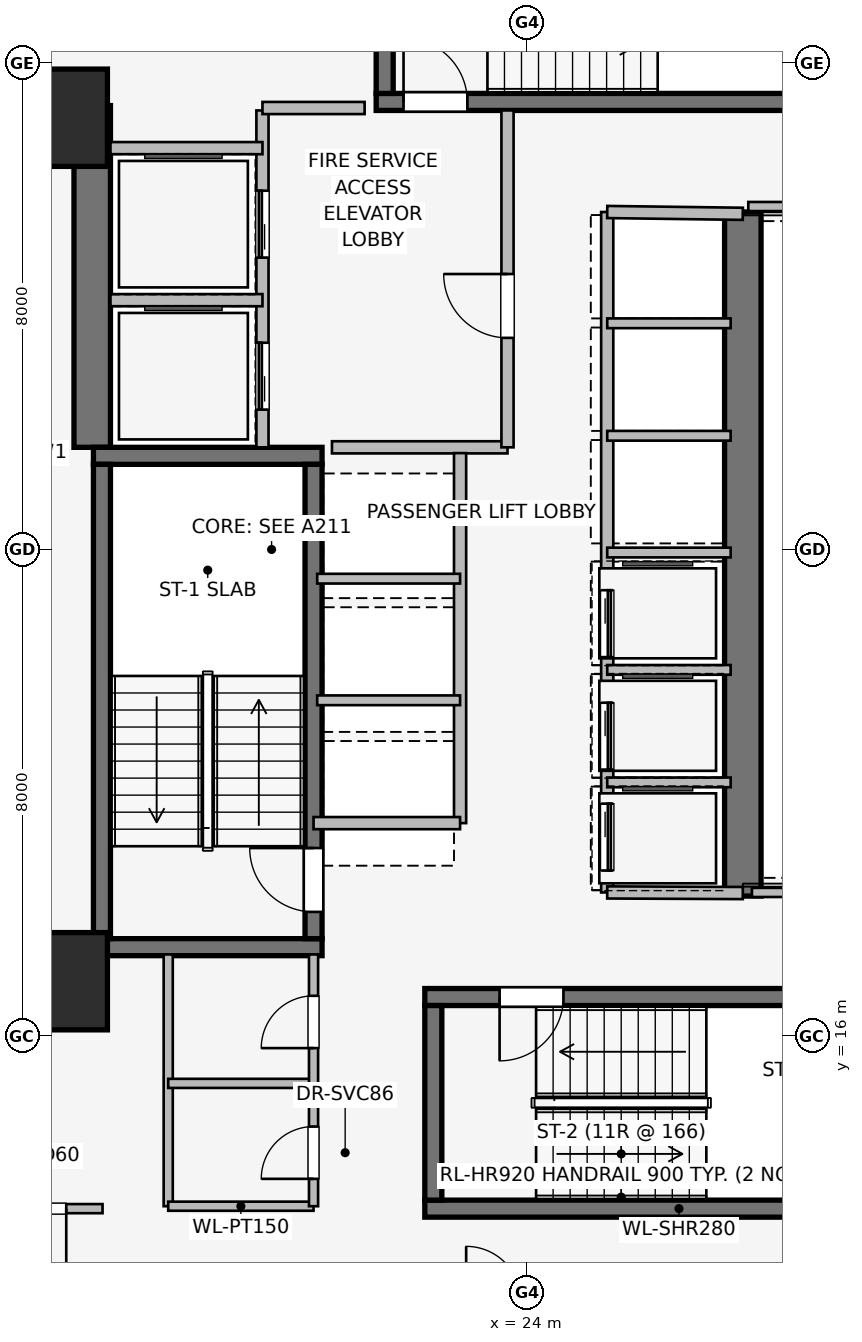
"""IFC4 building model, lengths in metres.
Left out: names, types, materials, properties, quantities, classifications, styles, units other than length and angle.
Written with IfcOpenShell. Run it as: python <this file> out.ifc"""

import sys

from ifc_helpers import new_model, si_unit, direction, frame, frame_2d, origin, origin_2d, place, context, subcontext, project, spatial, rectangle, extrude, element, fill, save


model = new_model("IFC4")
c1 = context("Model", 3, precision=1e-05, world=origin(), true_north=direction((0.0, 1.0)))
c2 = subcontext(c1, "Body", "Model", "MODEL_VIEW")
j1 = project(units=[si_unit("LENGTHUNIT", "METRE"), si_unit("PLANEANGLEUNIT", "RADIAN")], contexts=[c1])
p1 = place(None, origin())
s1 = spatial("IfcSite", under=j1, at=p1, CompositionType="ELEMENT")
p2 = place(p1, origin())
s2 = spatial("IfcBuilding", under=s1, at=p2, CompositionType="ELEMENT")
p3 = place(p2, frame((0.0, 0.0, 37.95)))
s3 = spatial("IfcBuildingStorey", under=s2, at=p3, CompositionType="ELEMENT", Elevation=37.95)
p4 = place(p3, frame((16.85, 25.68, 0.0), z_axis=(0.0, 0.0, 1.0), x_axis=(0.0, 1.0, 0.0)))
e1 = element("IfcWall", 1, at=p4, inside=s3, PredefinedType="SHEAR", context=c2, shape_type="SweptSolid", body=[
    extrude(rectangle(XDim=5.62, YDim=0.6, at=frame_2d((2.81, 0.0))), origin(), (0.0, 0.0, 1.0), 3.65),
])
p5 = place(p3, frame((27.55, 29.55, 0.0), z_axis=(0.0, 0.0, 1.0), x_axis=(0.0, -1.0, 0.0)))
e2 = element("IfcWall", 2, at=p5, inside=s3, PredefinedType="SHEAR", context=c2, shape_type="SweptSolid", body=[
    extrude(rectangle(XDim=11.25, YDim=0.6, at=frame_2d((5.625, 0.0))), origin(), (0.0, 0.0, 1.0), 3.65),
])
for number, where, z_axis, x_axis in (
    (3, (16.87, 17.46, 0.0), (0.0, 0.0, 1.0), (1.0, 0.0, 0.0)),
    (4, (20.63, 25.54, 0.0), (0.0, 0.0, 1.0), (-1.0, 0.0, 0.0)),
):
    element("IfcWall", number, at=place(p3, frame(where, z_axis=z_axis, x_axis=x_axis)), inside=s3, PredefinedType="SHEAR", context=c2, shape_type="SweptSolid", body=[
        extrude(rectangle(XDim=3.76, YDim=0.28, at=frame_2d((1.88, 0.0))), origin(), (0.0, 0.0, 1.0), 3.65),
    ])
p6 = place(p3, frame((17.01, 25.4, 0.0), z_axis=(0.0, 0.0, 1.0), x_axis=(0.0, -1.0, 0.0)))
e5 = element("IfcWall", 5, at=p6, inside=s3, PredefinedType="SHEAR", context=c2, shape_type="SweptSolid", body=[
    extrude(rectangle(XDim=7.8, YDim=0.28, at=frame_2d((3.9, 0.0))), origin(), (0.0, 0.0, 1.0), 3.65),
])
p7 = place(p3, frame((20.49, 17.6, 0.0), z_axis=(0.0, 0.0, 1.0), x_axis=(0.0, 1.0, 0.0)))
e6 = element("IfcWall", 6, at=p7, inside=s3, PredefinedType="SHEAR", context=c2, shape_type="SweptSolid", body=[
    extrude(rectangle(XDim=7.8, YDim=0.28, at=frame_2d((3.9, 0.0))), origin(), (0.0, 0.0, 1.0), 3.65),
])
p8 = place(p7, frame((0.44, 0.0, 0.0)))
e7 = element("IfcOpeningElement", 7, at=p8, cuts=e6, PredefinedType="OPENING", context=c2, shape_type="SweptSolid", body=[
    extrude(rectangle(XDim=1.05, YDim=2.0, at=frame_2d((0.525, 1.0))), frame((0.0, 0.15, 0.0), z_axis=(0.0, -1.0, 0.0), x_axis=(1.0, 0.0, 0.0)), (0.0, 0.0, 1.0), 0.3),
])
p9 = place(p3, frame((22.32, 13.16, 0.0), z_axis=(0.0, 0.0, 1.0), x_axis=(1.0, 0.0, 0.0)))
e8 = element("IfcWall", 8, at=p9, inside=s3, PredefinedType="SHEAR", context=c2, shape_type="SweptSolid", body=[
    extrude(rectangle(XDim=8.36, YDim=0.28, at=frame_2d((4.18, 0.0))), origin(), (0.0, 0.0, 1.0), 3.65),
])
p10 = place(p3, frame((30.68, 16.64, 0.0), z_axis=(0.0, 0.0, 1.0), x_axis=(-1.0, 0.0, 0.0)))
e9 = element("IfcWall", 9, at=p10, inside=s3, PredefinedType="SHEAR", context=c2, shape_type="SweptSolid", body=[
    extrude(rectangle(XDim=8.36, YDim=0.28, at=frame_2d((4.18, 0.0))), origin(), (0.0, 0.0, 1.0), 3.65),
])
p11 = place(p10, frame((6.08, 0.0, 0.0)))
e10 = element("IfcOpeningElement", 10, at=p11, cuts=e9, PredefinedType="OPENING", context=c2, shape_type="SweptSolid", body=[
    extrude(rectangle(XDim=1.05, YDim=2.0, at=frame_2d((0.525, 1.0))), frame((0.0, 0.15, 0.0), z_axis=(0.0, -1.0, 0.0), x_axis=(1.0, 0.0, 0.0)), (0.0, 0.0, 1.0), 0.3),
])
p12 = place(p3, frame((22.46, 16.5, 0.0), z_axis=(0.0, 0.0, 1.0), x_axis=(0.0, -1.0, 0.0)))
e11 = element("IfcWall", 11, at=p12, inside=s3, PredefinedType="SHEAR", context=c2, shape_type="SweptSolid", body=[
    extrude(rectangle(XDim=3.2, YDim=0.28, at=frame_2d((1.6, 0.0))), origin(), (0.0, 0.0, 1.0), 3.65),
])
p13 = place(p3, frame((21.52, 31.36, 0.0), z_axis=(0.0, 0.0, 1.0), x_axis=(1.0, 0.0, 0.0)))
e12 = element("IfcWall", 12, at=p13, inside=s3, PredefinedType="SHEAR", context=c2, shape_type="SweptSolid", body=[
    extrude(rectangle(XDim=8.36, YDim=0.28, at=frame_2d((4.18, 0.0))), origin(), (0.0, 0.0, 1.0), 3.65),
])
p14 = place(p13, frame((0.45, 0.0, 0.0)))
e13 = element("IfcOpeningElement", 13, at=p14, cuts=e12, PredefinedType="OPENING", context=c2, shape_type="SweptSolid", body=[
    extrude(rectangle(XDim=1.05, YDim=2.0, at=frame_2d((0.525, 1.0))), frame((0.0, 0.15, 0.0), z_axis=(0.0, -1.0, 0.0), x_axis=(1.0, 0.0, 0.0)), (0.0, 0.0, 1.0), 0.3),
])
p15 = place(p3, frame((21.66, 34.7, 0.0), z_axis=(0.0, 0.0, 1.0), x_axis=(0.0, -1.0, 0.0)))
e14 = element("IfcWall", 14, at=p15, inside=s3, PredefinedType="SHEAR", context=c2, shape_type="SweptSolid", body=[
    extrude(rectangle(XDim=3.2, YDim=0.28, at=frame_2d((1.6, 0.0))), origin(), (0.0, 0.0, 1.0), 3.65),
])
for number, where, z_axis, x_axis in (
    (15, (16.3, 16.9, 0.0), (0.0, 0.0, 1.0), (1.0, 0.0, 0.0)),
    (16, (16.3, 31.1, 0.0), (0.0, 0.0, 1.0), (1.0, 0.0, 0.0)),
):
    element("IfcColumn", number, at=place(p3, frame(where, z_axis=z_axis, x_axis=x_axis)), inside=s3, PredefinedType="COLUMN", context=c2, shape_type="SweptSolid", body=[
        extrude(rectangle(XDim=1.6, YDim=1.6, at=origin_2d()), origin(), (0.0, 0.0, 1.0), 3.65),
    ])
p16 = place(p3, frame((19.65, 25.68, 0.0), z_axis=(0.0, 0.0, 1.0), x_axis=(0.0, 1.0, 0.0)))
e17 = element("IfcWall", 17, at=p16, inside=s3, PredefinedType="PARTITIONING", context=c2, shape_type="SweptSolid", body=[
    extrude(rectangle(XDim=5.54, YDim=0.2, at=frame_2d((2.77, 0.0))), origin(), (0.0, 0.0, 1.0), 3.39),
])
p17 = place(p16, frame((0.62, 0.0, 0.0)))
e18 = element("IfcOpeningElement", 18, at=p17, cuts=e17, PredefinedType="OPENING", context=c2, shape_type="SweptSolid", body=[
    extrude(rectangle(XDim=1.1, YDim=2.2, at=frame_2d((0.55, 1.1))), frame((0.0, 0.11, 0.0), z_axis=(0.0, -1.0, 0.0), x_axis=(1.0, 0.0, 0.0)), (0.0, 0.0, 1.0), 0.22),
])
p18 = place(p16, frame((3.12, 0.0, 0.0)))
e19 = element("IfcOpeningElement", 19, at=p18, cuts=e17, PredefinedType="OPENING", context=c2, shape_type="SweptSolid", body=[
    extrude(rectangle(XDim=1.1, YDim=2.2, at=frame_2d((0.55, 1.1))), frame((0.0, 0.11, 0.0), z_axis=(0.0, -1.0, 0.0), x_axis=(1.0, 0.0, 0.0)), (0.0, 0.0, 1.0), 0.22),
])
p19 = place(p3, frame((20.793, 25.68, 0.0), z_axis=(0.0, 0.0, 1.0), x_axis=(1.0, 0.0, 0.0)))
e20 = element("IfcWall", 20, at=p19, inside=s3, PredefinedType="PARTITIONING", context=c2, shape_type="SweptSolid", body=[
    extrude(rectangle(XDim=2.887, YDim=0.2, at=frame_2d((1.443, 0.0))), origin(), (0.0, 0.0, 1.0), 3.39),
])
p20 = place(p3, frame((23.68, 25.68, 0.0), z_axis=(0.0, 0.0, 1.0), x_axis=(0.0, 1.0, 0.0)))
e21 = element("IfcWall", 21, at=p20, inside=s3, PredefinedType="PARTITIONING", context=c2, shape_type="SweptSolid", body=[
    extrude(rectangle(XDim=5.54, YDim=0.2, at=frame_2d((2.77, 0.0))), origin(), (0.0, 0.0, 1.0), 3.39),
])
p21 = place(p20, frame((1.8, 0.0, 0.0)))
e22 = element("IfcOpeningElement", 22, at=p21, cuts=e21, PredefinedType="OPENING", context=c2, shape_type="SweptSolid", body=[
    extrude(rectangle(XDim=1.05, YDim=2.0, at=frame_2d((0.525, 1.0))), frame((0.0, 0.11, 0.0), z_axis=(0.0, -1.0, 0.0), x_axis=(1.0, 0.0, 0.0)), (0.0, 0.0, 1.0), 0.22),
])
p22 = place(p3, frame((21.33, 31.26, 0.0), z_axis=(0.0, 0.0, 1.0), x_axis=(-1.0, 0.0, 0.0)))
e23 = element("IfcWall", 23, at=p22, inside=s3, PredefinedType="PARTITIONING", context=c2, shape_type="SweptSolid", body=[
    extrude(rectangle(XDim=1.68, YDim=0.2, at=frame_2d((0.84, 0.0))), origin(), (0.0, 0.0, 1.0), 3.39),
])
p23 = place(p3, frame((17.15, 28.1, 0.0), z_axis=(0.0, 0.0, 1.0), x_axis=(1.0, 0.0, 0.0)))
e24 = element("IfcWall", 24, at=p23, inside=s3, PredefinedType="PARTITIONING", context=c2, shape_type="SweptSolid", body=[
    extrude(rectangle(XDim=2.5, YDim=0.2, at=frame_2d((1.25, 0.0))), origin(), (0.0, 0.0, 1.0), 3.39),
])
p24 = place(p3, frame((19.65, 30.6, 0.0), z_axis=(0.0, 0.0, 1.0), x_axis=(-1.0, 0.0, 0.0)))
e25 = element("IfcWall", 25, at=p24, inside=s3, PredefinedType="PARTITIONING", context=c2, shape_type="SweptSolid", body=[
    extrude(rectangle(XDim=2.5, YDim=0.2, at=frame_2d((1.25, 0.0))), origin(), (0.0, 0.0, 1.0), 2.29),
])
p25 = place(p3, frame((22.9, 19.5, 0.0), z_axis=(0.0, 0.0, 1.0), x_axis=(0.0, 1.0, 0.0)))
e26 = element("IfcWall", 26, at=p25, inside=s3, PredefinedType="PARTITIONING", context=c2, shape_type="SweptSolid", body=[
    extrude(rectangle(XDim=6.085, YDim=0.2, at=frame_2d((3.042, 0.0))), origin(), (0.0, 0.0, 1.0), 3.39),
])
p26 = place(p3, frame((20.49, 19.5, 0.0), z_axis=(0.0, 0.0, 1.0), x_axis=(1.0, 0.0, 0.0)))
e27 = element("IfcWall", 27, at=p26, inside=s3, PredefinedType="PARTITIONING", context=c2, shape_type="SweptSolid", body=[
    extrude(rectangle(XDim=2.41, YDim=0.2, at=frame_2d((1.205, 0.0))), origin(), (0.0, 0.0, 1.0), 2.29),
])
for number, where, z_axis, x_axis in (
    (28, (20.55, 21.52, 0.0), (0.0, 0.0, 1.0), (1.0, 0.0, 0.0)),
    (29, (20.55, 23.52, 0.0), (0.0, 0.0, 1.0), (1.0, 0.0, 0.0)),
):
    element("IfcWall", number, at=place(p3, frame(where, z_axis=z_axis, x_axis=x_axis)), inside=s3, PredefinedType="PARTITIONING", context=c2, shape_type="SweptSolid", body=[
        extrude(rectangle(XDim=2.35, YDim=0.16, at=frame_2d((1.175, 0.0))), origin(), (0.0, 0.0, 1.0), 3.39),
    ])
p27 = place(p3, frame((25.32, 29.55, 0.0), z_axis=(0.0, 0.0, 1.0), x_axis=(0.0, -1.0, 0.0)))
e30 = element("IfcWall", 30, at=p27, inside=s3, PredefinedType="PARTITIONING", context=c2, shape_type="SweptSolid", body=[
    extrude(rectangle(XDim=11.19, YDim=0.2, at=frame_2d((5.595, 0.0))), origin(), (0.0, 0.0, 1.0), 3.39),
])
p28 = place(p27, frame((6.22, 0.0, 0.0)))
e31 = element("IfcOpeningElement", 31, at=p28, cuts=e30, PredefinedType="OPENING", context=c2, shape_type="SweptSolid", body=[
    extrude(rectangle(XDim=1.1, YDim=2.2, at=frame_2d((0.55, 1.1))), frame((0.0, 0.11, 0.0), z_axis=(0.0, -1.0, 0.0), x_axis=(1.0, 0.0, 0.0)), (0.0, 0.0, 1.0), 0.22),
])
p29 = place(p27, frame((8.07, 0.0, 0.0)))
e32 = element("IfcOpeningElement", 32, at=p29, cuts=e30, PredefinedType="OPENING", context=c2, shape_type="SweptSolid", body=[
    extrude(rectangle(XDim=1.1, YDim=2.2, at=frame_2d((0.55, 1.1))), frame((0.0, 0.11, 0.0), z_axis=(0.0, -1.0, 0.0), x_axis=(1.0, 0.0, 0.0)), (0.0, 0.0, 1.0), 0.22),
])
p30 = place(p27, frame((9.73, 0.0, 0.0)))
e33 = element("IfcOpeningElement", 33, at=p30, cuts=e30, PredefinedType="OPENING", context=c2, shape_type="SweptSolid", body=[
    extrude(rectangle(XDim=1.1, YDim=2.2, at=frame_2d((0.55, 1.1))), frame((0.0, 0.11, 0.0), z_axis=(0.0, -1.0, 0.0), x_axis=(1.0, 0.0, 0.0)), (0.0, 0.0, 1.0), 0.22),
])
p31 = place(p3, frame((25.32, 18.36, 0.0), z_axis=(0.0, 0.0, 1.0), x_axis=(0.999989925833, -0.004488678231, 0.0)))
e34 = element("IfcWall", 34, at=p31, inside=s3, PredefinedType="PARTITIONING", context=c2, shape_type="SweptSolid", body=[
    extrude(rectangle(XDim=2.23, YDim=0.2, at=frame_2d((1.115, 0.0))), origin(), (0.0, 0.0, 1.0), 3.39),
])
p32 = place(p3, frame((27.55, 29.52, 0.0), z_axis=(0.0, 0.0, 1.0), x_axis=(-0.999909343457, 0.013464949556, 0.0)))
e35 = element("IfcWall", 35, at=p32, inside=s3, PredefinedType="PARTITIONING", context=c2, shape_type="SweptSolid", body=[
    extrude(rectangle(XDim=2.23, YDim=0.2, at=frame_2d((1.115, 0.0))), origin(), (0.0, 0.0, 1.0), 2.29),
])
for number, where, z_axis, x_axis in (
    (36, (25.32, 20.17, 0.0), (0.0, 0.0, 1.0), (1.0, 0.0, 0.0)),
    (37, (25.32, 22.02, 0.0), (0.0, 0.0, 1.0), (1.0, 0.0, 0.0)),
    (38, (25.32, 23.95, 0.0), (0.0, 0.0, 1.0), (1.0, 0.0, 0.0)),
    (39, (25.32, 25.87, 0.0), (0.0, 0.0, 1.0), (1.0, 0.0, 0.0)),
    (40, (25.32, 27.72, 0.0), (0.0, 0.0, 1.0), (1.0, 0.0, 0.0)),
):
    element("IfcWall", number, at=place(p3, frame(where, z_axis=z_axis, x_axis=x_axis)), inside=s3, PredefinedType="PARTITIONING", context=c2, shape_type="SweptSolid", body=[
        extrude(rectangle(XDim=2.03, YDim=0.16, at=frame_2d((1.015, 0.0))), origin(), (0.0, 0.0, 1.0), 3.39),
    ])
p33 = place(p3, frame((18.1, 17.34, 0.0), z_axis=(0.0, 0.0, 1.0), x_axis=(0.0, -1.0, 0.0)))
e41 = element("IfcWall", 41, at=p33, inside=s3, PredefinedType="PARTITIONING", context=c2, shape_type="SweptSolid", body=[
    extrude(rectangle(XDim=4.14, YDim=0.15, at=frame_2d((2.07, 0.0))), origin(), (0.0, 0.0, 1.0), 3.39),
])
for number, where, z_axis, x_axis in (
    (42, (18.1, 13.2, 0.0), (0.0, 0.0, 1.0), (1.0, 0.0, 0.0)),
    (43, (18.1, 15.22, 0.0), (0.0, 0.0, 1.0), (1.0, 0.0, 0.0)),
):
    element("IfcWall", number, at=place(p3, frame(where, z_axis=z_axis, x_axis=x_axis)), inside=s3, PredefinedType="PARTITIONING", context=c2, shape_type="SweptSolid", body=[
        extrude(rectangle(XDim=2.39, YDim=0.15, at=frame_2d((1.195, 0.0))), origin(), (0.0, 0.0, 1.0), 3.39),
    ])
p34 = place(p3, frame((20.49, 13.2, 0.0), z_axis=(0.0, 0.0, 1.0), x_axis=(0.0, 1.0, 0.0)))
e44 = element("IfcWall", 44, at=p34, inside=s3, PredefinedType="PARTITIONING", context=c2, shape_type="SweptSolid", body=[
    extrude(rectangle(XDim=4.14, YDim=0.15, at=frame_2d((2.07, 0.0))), origin(), (0.0, 0.0, 1.0), 3.39),
])
p35 = place(p34, frame((0.45, 0.0, 0.0)))
e45 = element("IfcOpeningElement", 45, at=p35, cuts=e44, PredefinedType="OPENING", context=c2, shape_type="SweptSolid", body=[
    extrude(rectangle(XDim=0.86, YDim=2.0, at=frame_2d((0.43, 1.0))), frame((0.0, 0.085, 0.0), z_axis=(0.0, -1.0, 0.0), x_axis=(1.0, 0.0, 0.0)), (0.0, 0.0, 1.0), 0.17),
])
p36 = place(p34, frame((2.6, 0.0, 0.0)))
e46 = element("IfcOpeningElement", 46, at=p36, cuts=e44, PredefinedType="OPENING", context=c2, shape_type="SweptSolid", body=[
    extrude(rectangle(XDim=0.86, YDim=2.0, at=frame_2d((0.43, 1.0))), frame((0.0, 0.085, 0.0), z_axis=(0.0, -1.0, 0.0), x_axis=(1.0, 0.0, 0.0)), (0.0, 0.0, 1.0), 0.17),
])
p37 = place(p3, frame((27.7, 18.36, 0.0), z_axis=(0.0, 0.0, 1.0), x_axis=(1.0, 0.0, 0.0)))
e47 = element("IfcWall", 47, at=p37, inside=s3, PredefinedType="PARTITIONING", context=c2, shape_type="SweptSolid", body=[
    extrude(rectangle(XDim=12.14, YDim=0.15, at=frame_2d((6.07, 0.0))), origin(), (0.0, 0.0, 1.0), 2.531),
])
p38 = place(p3, frame((39.84, 29.64, 0.0), z_axis=(0.0, 0.0, 1.0), x_axis=(-1.0, 0.0, 0.0)))
e48 = element("IfcWall", 48, at=p38, inside=s3, PredefinedType="PARTITIONING", context=c2, shape_type="SweptSolid", body=[
    extrude(rectangle(XDim=12.2, YDim=0.15, at=frame_2d((6.1, 0.0))), origin(), (0.0, 0.0, 1.0), 2.531),
])
p39 = place(p3, frame((17.02, 13.16, 0.0), z_axis=(0.0, 0.0, 1.0), x_axis=(-1.0, 0.0, 0.0)))
e49 = element("IfcWall", 49, at=p39, inside=s3, PredefinedType="PARTITIONING", context=c2, shape_type="SweptSolid", body=[
    extrude(rectangle(XDim=2.12, YDim=0.15, at=frame_2d((1.06, 0.0))), origin(), (0.0, 0.0, 1.0), 3.39),
])
p40 = place(p39, frame((0.597, 0.0, 0.0)))
e50 = element("IfcOpeningElement", 50, at=p40, cuts=e49, PredefinedType="OPENING", context=c2, shape_type="SweptSolid", body=[
    extrude(rectangle(XDim=0.96, YDim=2.0, at=frame_2d((0.48, 1.0))), frame((0.0, 0.085, 0.0), z_axis=(0.0, -1.0, 0.0), x_axis=(1.0, 0.0, 0.0)), (0.0, 0.0, 1.0), 0.17),
])
p41 = place(p8, origin())
e51 = element("IfcDoor", 51, at=p41, inside=s3, OperationType="SINGLE_SWING_RIGHT", PredefinedType="DOOR", context=c2, shape_type="SweptSolid", body=[
    extrude(rectangle(XDim=1.05, YDim=2.0, at=frame_2d((0.525, 1.0))), frame((0.0, 0.025, 0.0), z_axis=(0.0, -1.0, 0.0), x_axis=(1.0, 0.0, 0.0)), (0.0, 0.0, 1.0), 0.05),
])
fill(e7, e51)
p42 = place(p11, origin())
e52 = element("IfcDoor", 52, at=p42, inside=s3, OperationType="SINGLE_SWING_RIGHT", PredefinedType="DOOR", context=c2, shape_type="SweptSolid", body=[
    extrude(rectangle(XDim=1.05, YDim=2.0, at=frame_2d((0.525, 1.0))), frame((0.0, 0.025, 0.0), z_axis=(0.0, -1.0, 0.0), x_axis=(1.0, 0.0, 0.0)), (0.0, 0.0, 1.0), 0.05),
])
fill(e10, e52)
p43 = place(p14, origin())
e53 = element("IfcDoor", 53, at=p43, inside=s3, OperationType="SINGLE_SWING_LEFT", PredefinedType="DOOR", context=c2, shape_type="SweptSolid", body=[
    extrude(rectangle(XDim=1.05, YDim=2.0, at=frame_2d((0.525, 1.0))), frame((0.0, 0.025, 0.0), z_axis=(0.0, -1.0, 0.0), x_axis=(1.0, 0.0, 0.0)), (0.0, 0.0, 1.0), 0.05),
])
fill(e13, e53)
p44 = place(p17, origin())
e54 = element("IfcDoor", 54, at=p44, inside=s3, OperationType="SLIDING_TO_LEFT", PredefinedType="DOOR", context=c2, shape_type="SweptSolid", body=[
    extrude(rectangle(XDim=1.1, YDim=2.2, at=frame_2d((0.55, 1.1))), frame((0.0, 0.025, 0.0), z_axis=(0.0, -1.0, 0.0), x_axis=(1.0, 0.0, 0.0)), (0.0, 0.0, 1.0), 0.05),
])
fill(e18, e54)
p45 = place(p18, origin())
e55 = element("IfcDoor", 55, at=p45, inside=s3, OperationType="SLIDING_TO_LEFT", PredefinedType="DOOR", context=c2, shape_type="SweptSolid", body=[
    extrude(rectangle(XDim=1.1, YDim=2.2, at=frame_2d((0.55, 1.1))), frame((0.0, 0.025, 0.0), z_axis=(0.0, -1.0, 0.0), x_axis=(1.0, 0.0, 0.0)), (0.0, 0.0, 1.0), 0.05),
])
fill(e19, e55)
p46 = place(p21, origin())
e56 = element("IfcDoor", 56, at=p46, inside=s3, OperationType="SINGLE_SWING_RIGHT", PredefinedType="DOOR", context=c2, shape_type="SweptSolid", body=[
    extrude(rectangle(XDim=1.05, YDim=2.0, at=frame_2d((0.525, 1.0))), frame((0.0, 0.025, 0.0), z_axis=(0.0, -1.0, 0.0), x_axis=(1.0, 0.0, 0.0)), (0.0, 0.0, 1.0), 0.05),
])
fill(e22, e56)
p47 = place(p28, origin())
e57 = element("IfcDoor", 57, at=p47, inside=s3, OperationType="SLIDING_TO_LEFT", PredefinedType="DOOR", context=c2, shape_type="SweptSolid", body=[
    extrude(rectangle(XDim=1.1, YDim=2.2, at=frame_2d((0.55, 1.1))), frame((0.0, 0.025, 0.0), z_axis=(0.0, -1.0, 0.0), x_axis=(1.0, 0.0, 0.0)), (0.0, 0.0, 1.0), 0.05),
])
fill(e31, e57)
p48 = place(p29, origin())
e58 = element("IfcDoor", 58, at=p48, inside=s3, OperationType="SLIDING_TO_LEFT", PredefinedType="DOOR", context=c2, shape_type="SweptSolid", body=[
    extrude(rectangle(XDim=1.1, YDim=2.2, at=frame_2d((0.55, 1.1))), frame((0.0, 0.025, 0.0), z_axis=(0.0, -1.0, 0.0), x_axis=(1.0, 0.0, 0.0)), (0.0, 0.0, 1.0), 0.05),
])
fill(e32, e58)
p49 = place(p30, origin())
e59 = element("IfcDoor", 59, at=p49, inside=s3, OperationType="SLIDING_TO_LEFT", PredefinedType="DOOR", context=c2, shape_type="SweptSolid", body=[
    extrude(rectangle(XDim=1.1, YDim=2.2, at=frame_2d((0.55, 1.1))), frame((0.0, 0.025, 0.0), z_axis=(0.0, -1.0, 0.0), x_axis=(1.0, 0.0, 0.0)), (0.0, 0.0, 1.0), 0.05),
])
fill(e33, e59)
p50 = place(p35, origin())
e60 = element("IfcDoor", 60, at=p50, inside=s3, OperationType="SINGLE_SWING_LEFT", PredefinedType="DOOR", context=c2, shape_type="SweptSolid", body=[
    extrude(rectangle(XDim=0.86, YDim=2.0, at=frame_2d((0.43, 1.0))), frame((0.0, 0.025, 0.0), z_axis=(0.0, -1.0, 0.0), x_axis=(1.0, 0.0, 0.0)), (0.0, 0.0, 1.0), 0.05),
])
fill(e45, e60)
p51 = place(p36, origin())
e61 = element("IfcDoor", 61, at=p51, inside=s3, OperationType="SINGLE_SWING_LEFT", PredefinedType="DOOR", context=c2, shape_type="SweptSolid", body=[
    extrude(rectangle(XDim=0.86, YDim=2.0, at=frame_2d((0.43, 1.0))), frame((0.0, 0.025, 0.0), z_axis=(0.0, -1.0, 0.0), x_axis=(1.0, 0.0, 0.0)), (0.0, 0.0, 1.0), 0.05),
])
fill(e46, e61)
p52 = place(p40, origin())
e62 = element("IfcDoor", 62, at=p52, inside=s3, OperationType="SINGLE_SWING_LEFT", PredefinedType="DOOR", context=c2, shape_type="SweptSolid", body=[
    extrude(rectangle(XDim=0.96, YDim=2.0, at=frame_2d((0.48, 1.0))), frame((0.0, 0.025, 0.0), z_axis=(0.0, -1.0, 0.0), x_axis=(1.0, 0.0, 0.0)), (0.0, 0.0, 1.0), 0.05),
])
fill(e50, e62)
save(model, sys.argv[1])
